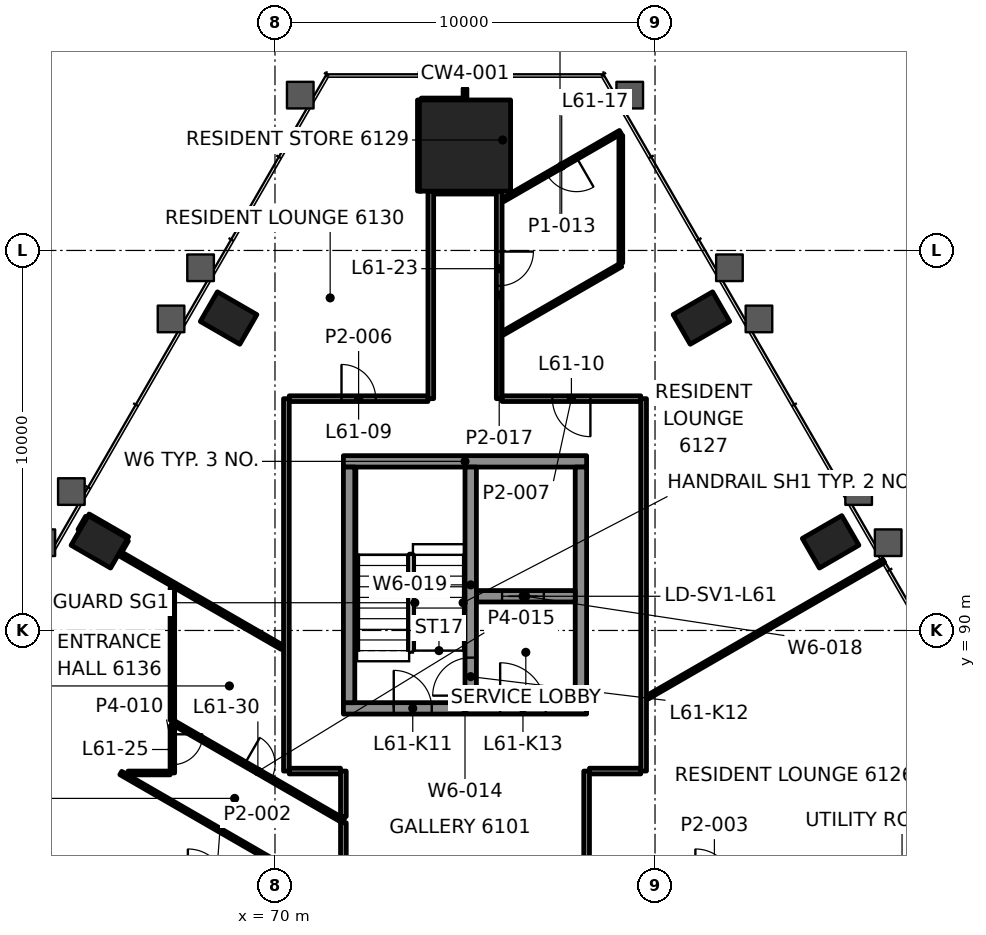
"""IFC4 building model, lengths in metres.
Left out: names, types, materials, properties, quantities, classifications, styles, units other than length and angle.
Written with IfcOpenShell. Run it as: python <this file> out.ifc"""

import sys

from ifc_helpers import new_model, si_unit, direction, frame, frame_2d, origin, origin_2d, place, context, subcontext, project, spatial, rectangle, hollow_rectangle, extrude, element, fill, save


model = new_model("IFC4")
c1 = context("Model", 3, precision=1e-05, world=origin(), true_north=direction((0.0, 1.0)))
c2 = subcontext(c1, "Body", "Model", "MODEL_VIEW")
j1 = project(units=[si_unit("LENGTHUNIT", "METRE"), si_unit("PLANEANGLEUNIT", "RADIAN")], contexts=[c1])
p1 = place(None, origin())
s1 = spatial("IfcSite", under=j1, at=p1, CompositionType="ELEMENT")
p2 = place(p1, origin())
s2 = spatial("IfcBuilding", under=s1, at=p2, CompositionType="ELEMENT")
p3 = place(p2, frame((0.0, 0.0, 260.1)))
s3 = spatial("IfcBuildingStorey", under=s2, at=p3, CompositionType="ELEMENT", Elevation=260.1)
p4 = place(p3, frame((75.0, 102.76, 0.0), z_axis=(0.0, 0.0, 1.0), x_axis=(-1.0, 0.0, 0.0)))
e1 = element("IfcColumn", 1, at=p4, inside=s3, PredefinedType="COLUMN", context=c2, shape_type="SweptSolid", body=[
    extrude(rectangle(XDim=2.4, YDim=2.4, at=origin_2d()), origin(), (0.0, 0.0, 1.0), 3.5),
])
for number, where, z_axis, x_axis in (
    (2, (84.621, 92.332, -0.0), (0.0, 0.0, 1.0), (-0.5, 0.866, 0.0)),
    (3, (81.22, 98.221, -0.0), (0.0, 0.0, 1.0), (-0.5, 0.866, 0.0)),
    (4, (68.78, 98.221, -0.0), (0.0, 0.0, 1.0), (-0.5, -0.866, 0.0)),
    (5, (65.379, 92.332, -0.0), (0.0, 0.0, 1.0), (-0.5, -0.866, 0.0)),
):
    element("IfcColumn", number, at=place(p3, frame(where, z_axis=z_axis, x_axis=x_axis)), inside=s3, PredefinedType="COLUMN", context=c2, shape_type="SweptSolid", body=[
        extrude(hollow_rectangle(XDim=0.9, YDim=1.2, WallThickness=0.06, at=origin_2d()), origin(), (0.0, 0.0, 1.0), 3.5),
    ])
p5 = place(p3, frame((71.8, 87.95, 0.0), z_axis=(0.0, 0.0, 1.0), x_axis=(1.0, 0.0, 0.0)))
e6 = element("IfcWall", 6, at=p5, inside=s3, PredefinedType="SHEAR", context=c2, shape_type="SweptSolid", body=[
    extrude(rectangle(XDim=6.4, YDim=0.3, at=frame_2d((3.2, 0.0))), origin(), (0.0, 0.0, 1.0), 3.3),
])
p6 = place(p5, frame((1.325, 0.0, 0.0)))
e7 = element("IfcOpeningElement", 7, at=p6, cuts=e6, PredefinedType="OPENING", context=c2, shape_type="SweptSolid", body=[
    extrude(rectangle(XDim=1.0, YDim=2.1, at=frame_2d((0.5, 1.05))), frame((0.0, 0.16, 0.0), z_axis=(0.0, -1.0, 0.0), x_axis=(1.0, 0.0, 0.0)), (0.0, 0.0, 1.0), 0.32),
])
p7 = place(p5, frame((4.125, 0.0, 0.0)))
e8 = element("IfcOpeningElement", 8, at=p7, cuts=e6, PredefinedType="OPENING", context=c2, shape_type="SweptSolid", body=[
    extrude(rectangle(XDim=1.2, YDim=2.1, at=frame_2d((0.6, 1.05))), frame((0.0, 0.16, 0.0), z_axis=(0.0, -1.0, 0.0), x_axis=(1.0, 0.0, 0.0)), (0.0, 0.0, 1.0), 0.32),
])
p8 = place(p3, frame((71.8, 94.45, 0.0), z_axis=(0.0, 0.0, 1.0), x_axis=(1.0, 0.0, 0.0)))
e9 = element("IfcWall", 9, at=p8, inside=s3, PredefinedType="SHEAR", context=c2, shape_type="SweptSolid", body=[
    extrude(rectangle(XDim=6.4, YDim=0.3, at=frame_2d((3.2, 0.0))), origin(), (0.0, 0.0, 1.0), 3.3),
])
for number, where, z_axis, x_axis in (
    (10, (71.95, 88.1, 0.0), (0.0, 0.0, 1.0), (0.0, 1.0, 0.0)),
    (11, (78.05, 88.1, 0.0), (0.0, 0.0, 1.0), (0.0, 1.0, 0.0)),
):
    element("IfcWall", number, at=place(p3, frame(where, z_axis=z_axis, x_axis=x_axis)), inside=s3, PredefinedType="SHEAR", context=c2, shape_type="SweptSolid", body=[
        extrude(rectangle(XDim=6.2, YDim=0.3, at=frame_2d((3.1, 0.0))), origin(), (0.0, 0.0, 1.0), 3.3),
    ])
p9 = place(p3, frame((75.3, 90.9, 0.0), z_axis=(0.0, 0.0, 1.0), x_axis=(1.0, 0.0, 0.0)))
e12 = element("IfcWall", 12, at=p9, inside=s3, PredefinedType="SHEAR", context=c2, shape_type="SweptSolid", body=[
    extrude(rectangle(XDim=2.6, YDim=0.3, at=frame_2d((1.3, 0.0))), origin(), (0.0, 0.0, 1.0), 3.3),
])
p10 = place(p9, frame((0.675, 0.0, 0.0)))
e13 = element("IfcOpeningElement", 13, at=p10, cuts=e12, PredefinedType="OPENING", context=c2, shape_type="SweptSolid", body=[
    extrude(rectangle(XDim=1.1, YDim=2.1, at=frame_2d((0.55, 1.05))), frame((0.0, 0.16, 0.0), z_axis=(0.0, -1.0, 0.0), x_axis=(1.0, 0.0, 0.0)), (0.0, 0.0, 1.0), 0.32),
])
p11 = place(p3, frame((75.15, 88.1, 0.0), z_axis=(0.0, 0.0, 1.0), x_axis=(0.0, 1.0, 0.0)))
e14 = element("IfcWall", 14, at=p11, inside=s3, PredefinedType="SHEAR", context=c2, shape_type="SweptSolid", body=[
    extrude(rectangle(XDim=6.2, YDim=0.3, at=frame_2d((3.1, 0.0))), origin(), (0.0, 0.0, 1.0), 3.3),
])
p12 = place(p11, frame((0.185, 0.0, 0.0)))
e15 = element("IfcOpeningElement", 15, at=p12, cuts=e14, PredefinedType="OPENING", context=c2, shape_type="SweptSolid", body=[
    extrude(rectangle(XDim=1.0, YDim=2.1, at=frame_2d((0.5, 1.05))), frame((0.0, 0.16, 0.0), z_axis=(0.0, -1.0, 0.0), x_axis=(1.0, 0.0, 0.0)), (0.0, 0.0, 1.0), 0.32),
])
p13 = place(p3, frame((66.133, 86.25, 0.0), z_axis=(0.0, 0.0, 1.0), x_axis=(1.0, 0.0, 0.0)))
e16 = element("IfcWall", 16, at=p13, inside=s3, PredefinedType="PARTITIONING", context=c2, shape_type="SweptSolid", body=[
    extrude(rectangle(XDim=1.106, YDim=0.1, at=frame_2d((0.553, 0.0))), origin(), (0.0, 0.0, 1.0), 2.7),
])
p14 = place(p3, frame((70.375, 86.3, 0.0), z_axis=(0.0, 0.0, 1.0), x_axis=(1.0, 0.0, 0.0)))
e17 = element("IfcWall", 17, at=p14, inside=s3, PredefinedType="PARTITIONING", context=c2, shape_type="SweptSolid", body=[
    extrude(rectangle(XDim=1.35, YDim=0.15, at=frame_2d((0.675, 0.0))), origin(), (0.0, 0.0, 1.0), 2.7),
])
p15 = place(p3, frame((78.275, 86.3, 0.0), z_axis=(0.0, 0.0, 1.0), x_axis=(1.0, 0.0, 0.0)))
e18 = element("IfcWall", 18, at=p15, inside=s3, PredefinedType="PARTITIONING", context=c2, shape_type="SweptSolid", body=[
    extrude(rectangle(XDim=1.35, YDim=0.15, at=frame_2d((0.675, 0.0))), origin(), (0.0, 0.0, 1.0), 2.7),
])
p16 = place(p3, frame((70.375, 96.1, 0.0), z_axis=(0.0, 0.0, 1.0), x_axis=(1.0, 0.0, 0.0)))
e19 = element("IfcWall", 19, at=p16, inside=s3, PredefinedType="PARTITIONING", context=c2, shape_type="SweptSolid", body=[
    extrude(rectangle(XDim=3.649, YDim=0.15, at=frame_2d((1.825, 0.0))), origin(), (0.0, 0.0, 1.0), 2.7),
])
p17 = place(p16, frame((1.375, 0.0, 0.0)))
e20 = element("IfcOpeningElement", 20, at=p17, cuts=e19, PredefinedType="OPENING", context=c2, shape_type="SweptSolid", body=[
    extrude(rectangle(XDim=0.9, YDim=2.1, at=frame_2d((0.45, 1.05))), frame((0.0, 0.085, 0.0), z_axis=(0.0, -1.0, 0.0), x_axis=(1.0, 0.0, 0.0)), (0.0, 0.0, 1.0), 0.17),
])
p18 = place(p3, frame((79.625, 96.1, 0.0), z_axis=(0.0, 0.0, 1.0), x_axis=(-1.0, 0.0, 0.0)))
e21 = element("IfcWall", 21, at=p18, inside=s3, PredefinedType="PARTITIONING", context=c2, shape_type="SweptSolid", body=[
    extrude(rectangle(XDim=3.649, YDim=0.15, at=frame_2d((1.825, 0.0))), origin(), (0.0, 0.0, 1.0), 2.7),
])
p19 = place(p18, frame((1.325, 0.0, 0.0)))
e22 = element("IfcOpeningElement", 22, at=p19, cuts=e21, PredefinedType="OPENING", context=c2, shape_type="SweptSolid", body=[
    extrude(rectangle(XDim=1.0, YDim=2.1, at=frame_2d((0.5, 1.05))), frame((0.0, 0.085, 0.0), z_axis=(0.0, -1.0, 0.0), x_axis=(1.0, 0.0, 0.0)), (0.0, 0.0, 1.0), 0.17),
])
p20 = place(p3, frame((74.18, 101.56, 0.0), z_axis=(0.0, 0.0, 1.0), x_axis=(1.0, 0.0, 0.0)))
e23 = element("IfcWall", 23, at=p20, inside=s3, PredefinedType="PARTITIONING", context=c2, shape_type="SweptSolid", body=[
    extrude(rectangle(XDim=1.644, YDim=0.15, at=frame_2d((0.822, 0.0))), origin(), (0.0, 0.0, 1.0), 2.697),
])
p21 = place(p3, frame((73.851, 103.96, 0.0), z_axis=(0.0, 0.0, 1.0), x_axis=(1.0, 0.0, 0.0)))
e24 = element("IfcWall", 24, at=p21, inside=s3, PredefinedType="PARTITIONING", context=c2, shape_type="SweptSolid", body=[
    extrude(rectangle(XDim=1.149, YDim=0.1, at=frame_2d((0.575, 0.0))), origin(), (0.0, 0.0, 1.0), 2.7),
])
p22 = place(p3, frame((79.801, 88.241, 0.0), z_axis=(0.0, 0.0, 1.0), x_axis=(0.866016264047, 0.500015830155, 0.0)))
e25 = element("IfcWall", 25, at=p22, inside=s3, PredefinedType="PARTITIONING", context=c2, shape_type="SweptSolid", body=[
    extrude(rectangle(XDim=7.179, YDim=0.1, at=frame_2d((3.59, 0.0))), origin(), (0.0, 0.0, 1.0), 2.688),
])
p23 = place(p3, frame((76.001, 97.825, 0.0), z_axis=(0.0, 0.0, 1.0), x_axis=(0.866021986329, 0.500005919159, 0.0)))
e26 = element("IfcWall", 26, at=p23, inside=s3, PredefinedType="PARTITIONING", context=c2, shape_type="SweptSolid", body=[
    extrude(rectangle(XDim=3.579, YDim=0.1, at=frame_2d((1.789, 0.0))), origin(), (0.0, 0.0, 1.0), 2.7),
])
p24 = place(p3, frame((79.089, 103.114, 0.0), z_axis=(0.0, 0.0, 1.0), x_axis=(-0.866000835515, -0.500042551078, 0.0)))
e27 = element("IfcWall", 27, at=p24, inside=s3, PredefinedType="PARTITIONING", context=c2, shape_type="SweptSolid", body=[
    extrude(rectangle(XDim=3.565, YDim=0.1, at=frame_2d((1.783, 0.0))), origin(), (0.0, 0.0, 1.0), 2.7),
])
p25 = place(p24, frame((1.333, 0.0, 0.0)))
e28 = element("IfcOpeningElement", 28, at=p25, cuts=e27, PredefinedType="OPENING", context=c2, shape_type="SweptSolid", body=[
    extrude(rectangle(XDim=0.9, YDim=2.1, at=frame_2d((0.45, 1.05))), frame((0.0, 0.06, 0.0), z_axis=(0.0, -1.0, 0.0), x_axis=(1.0, 0.0, 0.0)), (0.0, 0.0, 1.0), 0.12),
])
p26 = place(p3, frame((65.929, 92.085, 0.0), z_axis=(0.0, 0.0, 1.0), x_axis=(0.49970167553, 0.866197573001, 0.0)))
e29 = element("IfcWall", 29, at=p26, inside=s3, PredefinedType="PARTITIONING", context=c2, shape_type="SweptSolid", body=[
    extrude(rectangle(XDim=0.339, YDim=0.1, at=frame_2d((0.169, 0.0))), origin(), (0.0, 0.0, 1.0), 2.7),
])
p27 = place(p3, frame((64.86, 92.633, 0.0), z_axis=(0.0, 0.0, 1.0), x_axis=(0.500481453673, 0.865747257882, 0.0)))
e30 = element("IfcWall", 30, at=p27, inside=s3, PredefinedType="PARTITIONING", context=c2, shape_type="SweptSolid", body=[
    extrude(rectangle(XDim=0.399, YDim=0.1, at=frame_2d((0.199, 0.0))), origin(), (0.0, 0.0, 1.0), 2.7),
])
p28 = place(p3, frame((79.7, 86.301, 0.0), z_axis=(0.0, 0.0, 1.0), x_axis=(0.0, 1.0, 0.0)))
e31 = element("IfcWall", 31, at=p28, inside=s3, PredefinedType="PARTITIONING", context=c2, shape_type="SweptSolid", body=[
    extrude(rectangle(XDim=9.799, YDim=0.15, at=frame_2d((4.899, 0.0))), origin(), (0.0, 0.0, 1.0), 2.7),
])
p29 = place(p3, frame((79.1, 99.672, 0.0), z_axis=(0.0, 0.0, 1.0), x_axis=(0.0, 1.0, 0.0)))
e32 = element("IfcWall", 32, at=p29, inside=s3, PredefinedType="PARTITIONING", context=c2, shape_type="SweptSolid", body=[
    extrude(rectangle(XDim=3.354, YDim=0.1, at=frame_2d((1.677, 0.0))), origin(), (0.0, 0.0, 1.0), 2.7),
])
p30 = place(p3, frame((78.2, 83.325, 0.0), z_axis=(0.0, 0.0, 1.0), x_axis=(0.0, 1.0, 0.0)))
e33 = element("IfcWall", 33, at=p30, inside=s3, PredefinedType="PARTITIONING", context=c2, shape_type="SweptSolid", body=[
    extrude(rectangle(XDim=2.975, YDim=0.15, at=frame_2d((1.488, 0.0))), origin(), (0.0, 0.0, 1.0), 2.622),
])
p31 = place(p3, frame((75.9, 101.56, 0.0), z_axis=(0.0, 0.0, 1.0), x_axis=(0.0, -1.0, 0.0)))
e34 = element("IfcWall", 34, at=p31, inside=s3, PredefinedType="PARTITIONING", context=c2, shape_type="SweptSolid", body=[
    extrude(rectangle(XDim=5.46, YDim=0.15, at=frame_2d((2.73, 0.0))), origin(), (0.0, 0.0, 1.0), 2.7),
])
p32 = place(p31, frame((1.59, 0.0, 0.0)))
e35 = element("IfcOpeningElement", 35, at=p32, cuts=e34, PredefinedType="OPENING", context=c2, shape_type="SweptSolid", body=[
    extrude(rectangle(XDim=0.9, YDim=2.1, at=frame_2d((0.45, 1.05))), frame((0.0, 0.085, 0.0), z_axis=(0.0, -1.0, 0.0), x_axis=(1.0, 0.0, 0.0)), (0.0, 0.0, 1.0), 0.17),
])
p33 = place(p3, frame((75.0, 104.01, 0.0), z_axis=(0.0, 0.0, 1.0), x_axis=(0.0, 1.0, 0.0)))
e36 = element("IfcWall", 36, at=p33, inside=s3, PredefinedType="PARTITIONING", context=c2, shape_type="SweptSolid", body=[
    extrude(rectangle(XDim=0.25, YDim=0.1, at=frame_2d((0.125, 0.0))), origin(), (0.0, 0.0, 1.0), 2.7),
])
p34 = place(p3, frame((74.1, 96.1, 0.0), z_axis=(0.0, 0.0, 1.0), x_axis=(0.0, 1.0, 0.0)))
e37 = element("IfcWall", 37, at=p34, inside=s3, PredefinedType="PARTITIONING", context=c2, shape_type="SweptSolid", body=[
    extrude(rectangle(XDim=5.46, YDim=0.15, at=frame_2d((2.73, 0.0))), origin(), (0.0, 0.0, 1.0), 2.7),
])
p35 = place(p3, frame((73.8, 101.561, 0.0), z_axis=(0.0, 0.0, 1.0), x_axis=(0.0, 1.0, 0.0)))
e38 = element("IfcWall", 38, at=p35, inside=s3, PredefinedType="PARTITIONING", context=c2, shape_type="SweptSolid", body=[
    extrude(rectangle(XDim=2.399, YDim=0.1, at=frame_2d((1.199, 0.0))), origin(), (0.0, 0.0, 1.0), 2.7),
])
p36 = place(p3, frame((71.8, 83.325, 0.0), z_axis=(0.0, 0.0, 1.0), x_axis=(0.0, 1.0, 0.0)))
e39 = element("IfcWall", 39, at=p36, inside=s3, PredefinedType="PARTITIONING", context=c2, shape_type="SweptSolid", body=[
    extrude(rectangle(XDim=1.614, YDim=0.15, at=frame_2d((0.807, 0.0))), origin(), (0.0, 0.0, 1.0), 2.622),
])
p37 = place(p3, frame((70.3, 86.3, 0.0), z_axis=(0.0, 0.0, 1.0), x_axis=(0.0, 1.0, 0.0)))
e40 = element("IfcWall", 40, at=p37, inside=s3, PredefinedType="PARTITIONING", context=c2, shape_type="SweptSolid", body=[
    extrude(rectangle(XDim=9.8, YDim=0.15, at=frame_2d((4.9, 0.0))), origin(), (0.0, 0.0, 1.0), 2.7),
])
p38 = place(p3, frame((67.3, 87.485, 0.0), z_axis=(0.0, 0.0, 1.0), x_axis=(0.0, -1.0, 0.0)))
e41 = element("IfcWall", 41, at=p38, inside=s3, PredefinedType="PARTITIONING", context=c2, shape_type="SweptSolid", body=[
    extrude(rectangle(XDim=1.234, YDim=0.12, at=frame_2d((0.617, 0.0))), origin(), (0.0, 0.0, 1.0), 2.622),
])
p39 = place(p38, frame((0.217, 0.0, 0.0)))
e42 = element("IfcOpeningElement", 42, at=p39, cuts=e41, PredefinedType="OPENING", context=c2, shape_type="SweptSolid", body=[
    extrude(rectangle(XDim=0.8, YDim=2.1, at=frame_2d((0.4, 1.05))), frame((0.0, 0.07, 0.0), z_axis=(0.0, -1.0, 0.0), x_axis=(1.0, 0.0, 0.0)), (0.0, 0.0, 1.0), 0.14),
])
p40 = place(p3, frame((66.124, 92.422, 0.0), z_axis=(0.0, 0.0, 1.0), x_axis=(-0.865978732077, 0.500080829057, 0.0)))
e43 = element("IfcWall", 43, at=p40, inside=s3, PredefinedType="PARTITIONING", context=c2, shape_type="SweptSolid", body=[
    extrude(rectangle(XDim=1.199, YDim=0.1, at=frame_2d((0.6, 0.0))), origin(), (0.0, 0.0, 1.0), 2.688),
])
p41 = place(p3, frame((70.19, 89.555, 0.0), z_axis=(0.0, 0.0, 1.0), x_axis=(-0.866036249428, 0.499981214323, 0.0)))
e44 = element("IfcWall", 44, at=p41, inside=s3, PredefinedType="PARTITIONING", context=c2, shape_type="SweptSolid", body=[
    extrude(rectangle(XDim=4.955, YDim=0.12, at=frame_2d((2.478, 0.0))), origin(), (0.0, 0.0, 1.0), 2.7),
])
p42 = place(p3, frame((67.3, 87.589, 0.0), z_axis=(0.0, 0.0, 1.0), x_axis=(0.866019710441, -0.50000986103, 0.0)))
e45 = element("IfcWall", 45, at=p42, inside=s3, PredefinedType="PARTITIONING", context=c2, shape_type="SweptSolid", body=[
    extrude(rectangle(XDim=5.196, YDim=0.12, at=frame_2d((2.598, 0.0))), origin(), (0.0, 0.0, 1.0), 2.7),
])
p43 = place(p42, frame((2.198, 0.0, 0.0)))
e46 = element("IfcOpeningElement", 46, at=p43, cuts=e45, PredefinedType="OPENING", context=c2, shape_type="SweptSolid", body=[
    extrude(rectangle(XDim=0.8, YDim=2.1, at=frame_2d((0.4, 1.05))), frame((0.0, 0.07, 0.0), z_axis=(0.0, -1.0, 0.0), x_axis=(1.0, 0.0, 0.0)), (0.0, 0.0, 1.0), 0.14),
])
p44 = place(p3, frame((70.929, 83.37, 0.0), z_axis=(0.0, 0.0, 1.0), x_axis=(-0.866032366698, 0.499987939687, 0.0)))
e47 = element("IfcWall", 47, at=p44, inside=s3, PredefinedType="PARTITIONING", context=c2, shape_type="SweptSolid", body=[
    extrude(rectangle(XDim=5.758, YDim=0.1, at=frame_2d((2.879, 0.0))), origin(), (0.0, 0.0, 1.0), 2.7),
])
p45 = place(p3, frame((71.8, 85.103, 0.0), z_axis=(0.0, 0.0, 1.0), x_axis=(0.0, 1.0, 0.0)))
e48 = element("IfcWall", 48, at=p45, inside=s3, PredefinedType="PARTITIONING", context=c2, shape_type="SweptSolid", body=[
    extrude(rectangle(XDim=1.197, YDim=0.15, at=frame_2d((0.598, 0.0))), origin(), (0.0, 0.0, 1.0), 2.7),
])
p46 = place(p3, frame((67.3, 87.641, 0.0), z_axis=(0.0, 0.0, 1.0), x_axis=(0.0, 1.0, 0.0)))
e49 = element("IfcWall", 49, at=p46, inside=s3, PredefinedType="PARTITIONING", context=c2, shape_type="SweptSolid", body=[
    extrude(rectangle(XDim=3.473, YDim=0.12, at=frame_2d((1.737, 0.0))), origin(), (0.0, 0.0, 1.0), 2.7),
])
p47 = place(p17, origin())
e50 = element("IfcDoor", 50, at=p47, inside=s3, OperationType="SINGLE_SWING_LEFT", PredefinedType="DOOR", context=c2, shape_type="SweptSolid", body=[
    extrude(rectangle(XDim=0.9, YDim=2.1, at=frame_2d((0.45, 1.05))), frame((0.0, 0.025, 0.0), z_axis=(0.0, -1.0, 0.0), x_axis=(1.0, 0.0, 0.0)), (0.0, 0.0, 1.0), 0.05),
])
fill(e20, e50)
p48 = place(p19, origin())
e51 = element("IfcDoor", 51, at=p48, inside=s3, OperationType="SINGLE_SWING_LEFT", PredefinedType="DOOR", context=c2, shape_type="SweptSolid", body=[
    extrude(rectangle(XDim=1.0, YDim=2.1, at=frame_2d((0.5, 1.05))), frame((0.0, 0.025, 0.0), z_axis=(0.0, -1.0, 0.0), x_axis=(1.0, 0.0, 0.0)), (0.0, 0.0, 1.0), 0.05),
])
fill(e22, e51)
p49 = place(p25, origin())
e52 = element("IfcDoor", 52, at=p49, inside=s3, OperationType="SINGLE_SWING_LEFT", PredefinedType="DOOR", context=c2, shape_type="SweptSolid", body=[
    extrude(rectangle(XDim=0.9, YDim=2.1, at=frame_2d((0.45, 1.05))), frame((0.0, 0.025, 0.0), z_axis=(0.0, -1.0, 0.0), x_axis=(1.0, 0.0, 0.0)), (0.0, 0.0, 1.0), 0.05),
])
fill(e28, e52)
p50 = place(p32, origin())
e53 = element("IfcDoor", 53, at=p50, inside=s3, OperationType="SINGLE_SWING_RIGHT", PredefinedType="DOOR", context=c2, shape_type="SweptSolid", body=[
    extrude(rectangle(XDim=0.9, YDim=2.1, at=frame_2d((0.45, 1.05))), frame((0.0, 0.025, 0.0), z_axis=(0.0, -1.0, 0.0), x_axis=(1.0, 0.0, 0.0)), (0.0, 0.0, 1.0), 0.05),
])
fill(e35, e53)
p51 = place(p39, origin())
e54 = element("IfcDoor", 54, at=p51, inside=s3, OperationType="SINGLE_SWING_LEFT", PredefinedType="DOOR", context=c2, shape_type="SweptSolid", body=[
    extrude(rectangle(XDim=0.8, YDim=2.1, at=frame_2d((0.4, 1.05))), frame((0.0, 0.025, 0.0), z_axis=(0.0, -1.0, 0.0), x_axis=(1.0, 0.0, 0.0)), (0.0, 0.0, 1.0), 0.05),
])
fill(e42, e54)
p52 = place(p43, origin())
e55 = element("IfcDoor", 55, at=p52, inside=s3, OperationType="SINGLE_SWING_LEFT", PredefinedType="DOOR", context=c2, shape_type="SweptSolid", body=[
    extrude(rectangle(XDim=0.8, YDim=2.1, at=frame_2d((0.4, 1.05))), frame((0.0, 0.025, 0.0), z_axis=(0.0, -1.0, 0.0), x_axis=(1.0, 0.0, 0.0)), (0.0, 0.0, 1.0), 0.05),
])
fill(e46, e55)
p53 = place(p10, origin())
e56 = element("IfcDoor", 56, at=p53, inside=s3, OperationType="DOUBLE_DOOR_SLIDING", PredefinedType="DOOR", context=c2, shape_type="SweptSolid", body=[
    extrude(rectangle(XDim=1.1, YDim=2.1, at=frame_2d((0.55, 1.05))), frame((0.0, 0.025, 0.0), z_axis=(0.0, -1.0, 0.0), x_axis=(1.0, 0.0, 0.0)), (0.0, 0.0, 1.0), 0.05),
])
fill(e13, e56)
p54 = place(p6, origin())
e57 = element("IfcDoor", 57, at=p54, inside=s3, OperationType="SINGLE_SWING_RIGHT", PredefinedType="DOOR", context=c2, shape_type="SweptSolid", body=[
    extrude(rectangle(XDim=1.0, YDim=2.1, at=frame_2d((0.5, 1.05))), frame((0.0, 0.025, 0.0), z_axis=(0.0, -1.0, 0.0), x_axis=(1.0, 0.0, 0.0)), (0.0, 0.0, 1.0), 0.05),
])
fill(e7, e57)
p55 = place(p12, origin())
e58 = element("IfcDoor", 58, at=p55, inside=s3, OperationType="SINGLE_SWING_LEFT", PredefinedType="DOOR", context=c2, shape_type="SweptSolid", body=[
    extrude(rectangle(XDim=1.0, YDim=2.1, at=frame_2d((0.5, 1.05))), frame((0.0, 0.025, 0.0), z_axis=(0.0, -1.0, 0.0), x_axis=(1.0, 0.0, 0.0)), (0.0, 0.0, 1.0), 0.05),
])
fill(e15, e58)
p56 = place(p7, origin())
e59 = element("IfcDoor", 59, at=p56, inside=s3, OperationType="SINGLE_SWING_RIGHT", PredefinedType="DOOR", context=c2, shape_type="SweptSolid", body=[
    extrude(rectangle(XDim=1.2, YDim=2.1, at=frame_2d((0.6, 1.05))), frame((0.0, 0.025, 0.0), z_axis=(0.0, -1.0, 0.0), x_axis=(1.0, 0.0, 0.0)), (0.0, 0.0, 1.0), 0.05),
])
fill(e8, e59)
save(model, sys.argv[1])
